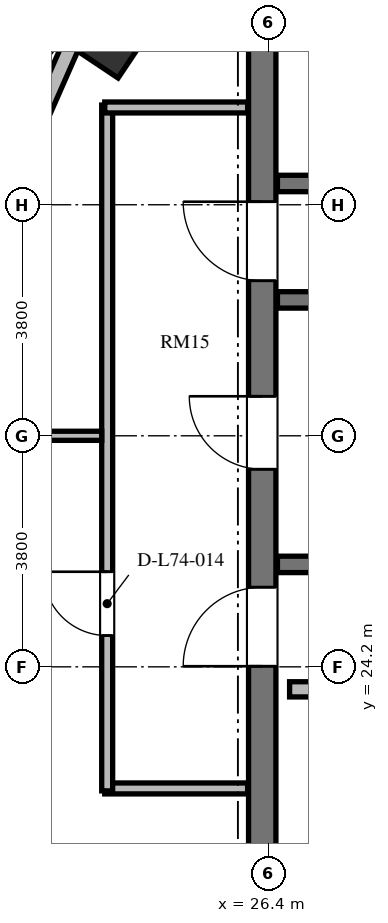
"""IFC4 building model, lengths in metres.
Left out: names, types, materials, properties, quantities, classifications, styles, units other than length and angle.
Written with IfcOpenShell. Run it as: python <this file> out.ifc"""

import sys

from ifc_helpers import new_model, si_unit, direction, frame, frame_2d, origin, origin_2d, place, context, subcontext, project, spatial, rectangle, extrude, element, fill, save


model = new_model("IFC4")
c1 = context("Model", 3, precision=1e-05, world=origin(), true_north=direction((0.0, 1.0)))
c2 = subcontext(c1, "Body", "Model", "MODEL_VIEW")
j1 = project(units=[si_unit("LENGTHUNIT", "METRE"), si_unit("PLANEANGLEUNIT", "RADIAN")], contexts=[c1])
p1 = place(None, origin())
s1 = spatial("IfcSite", under=j1, at=p1, CompositionType="ELEMENT")
p2 = place(p1, origin())
s2 = spatial("IfcBuilding", under=s1, at=p2, CompositionType="ELEMENT")
p3 = place(p2, frame((0.0, 0.0, 284.208)))
s3 = spatial("IfcBuildingStorey", under=s2, at=p3, CompositionType="ELEMENT", Elevation=284.208)
p4 = place(p3, frame((23.694, 34.522, 0.0), z_axis=(0.0, 0.0, 1.0), x_axis=(-0.831469612303, 0.55557023302, 0.0)))
e1 = element("IfcColumn", 1, at=p4, inside=s3, PredefinedType="COLUMN", context=c2, shape_type="SweptSolid", body=[
    extrude(rectangle(XDim=1.1, YDim=0.8, at=origin_2d()), origin(), (0.0, 0.0, 1.0), 3.648),
])
p5 = place(p3, frame((26.3, 20.95, 0.0), z_axis=(0.0, 0.0, 1.0), x_axis=(0.0, 1.0, 0.0)))
e2 = element("IfcWall", 2, at=p5, inside=s3, PredefinedType="SHEAR", context=c2, shape_type="SweptSolid", body=[
    extrude(rectangle(XDim=14.1, YDim=0.45, at=frame_2d((7.05, 0.0))), origin(), (0.0, 0.0, 1.0), 3.648),
])
p6 = place(p5, frame((6.5, 0.0, 0.0)))
e3 = element("IfcOpeningElement", 3, at=p6, cuts=e2, PredefinedType="OPENING", context=c2, shape_type="SweptSolid", body=[
    extrude(rectangle(XDim=1.2, YDim=2.15, at=frame_2d((0.6, 1.075))), frame((0.0, 0.235, 0.0), z_axis=(0.0, -1.0, 0.0), x_axis=(1.0, 0.0, 0.0)), (0.0, 0.0, 1.0), 0.47),
])
p7 = place(p5, frame((9.6, 0.0, 0.0)))
e4 = element("IfcOpeningElement", 4, at=p7, cuts=e2, PredefinedType="OPENING", context=c2, shape_type="SweptSolid", body=[
    extrude(rectangle(XDim=1.3, YDim=2.2, at=frame_2d((0.65, 1.1))), frame((0.0, 0.235, 0.0), z_axis=(0.0, -1.0, 0.0), x_axis=(1.0, 0.0, 0.0)), (0.0, 0.0, 1.0), 0.47),
])
p8 = place(p5, frame((3.26, 0.0, 0.0)))
e5 = element("IfcOpeningElement", 5, at=p8, cuts=e2, PredefinedType="OPENING", context=c2, shape_type="SweptSolid", body=[
    extrude(rectangle(XDim=1.3, YDim=2.2, at=frame_2d((0.65, 1.1))), frame((0.0, 0.235, 0.0), z_axis=(0.0, -1.0, 0.0), x_axis=(1.0, 0.0, 0.0)), (0.0, 0.0, 1.0), 0.47),
])
p9 = place(p3, frame((23.352, 34.869, 0.0), z_axis=(0.0, 0.0, 1.0), x_axis=(-0.402882523888, -0.915251698685, 0.0)))
e6 = element("IfcWall", 6, at=p9, inside=s3, PredefinedType="SOLIDWALL", context=c2, shape_type="SweptSolid", body=[
    extrude(rectangle(XDim=5.856, YDim=0.28, at=frame_2d((2.928, 0.0))), origin(), (0.0, 0.0, 1.0), 3.448),
])
p10 = place(p9, frame((2.328, 0.0, 0.85)))
e7 = element("IfcOpeningElement", 7, at=p10, cuts=e6, PredefinedType="OPENING", context=c2, shape_type="SweptSolid", body=[
    extrude(rectangle(XDim=1.2, YDim=1.8, at=frame_2d((0.6, 0.9))), frame((0.0, 0.15, 0.0), z_axis=(0.0, -1.0, 0.0), x_axis=(1.0, 0.0, 0.0)), (0.0, 0.0, 1.0), 0.3),
])
p11 = place(p3, frame((20.993, 24.09, 0.0), z_axis=(0.0, 0.0, 1.0), x_axis=(0.402867150469, -0.91525846572, 0.0)))
e8 = element("IfcWall", 8, at=p11, inside=s3, PredefinedType="SOLIDWALL", context=c2, shape_type="SweptSolid", body=[
    extrude(rectangle(XDim=5.856, YDim=0.28, at=frame_2d((2.928, 0.0))), origin(), (0.0, 0.0, 1.0), 3.448),
])
p12 = place(p11, frame((2.328, 0.0, 0.85)))
e9 = element("IfcOpeningElement", 9, at=p12, cuts=e8, PredefinedType="OPENING", context=c2, shape_type="SweptSolid", body=[
    extrude(rectangle(XDim=1.2, YDim=1.8, at=frame_2d((0.6, 0.9))), frame((0.0, 0.15, 0.0), z_axis=(0.0, -1.0, 0.0), x_axis=(1.0, 0.0, 0.0)), (0.0, 0.0, 1.0), 0.3),
])
for number, where, z_axis, x_axis in (
    (10, (26.55, 30.235, 0.0), (0.0, 0.0, 1.0), (1.0, 0.0, 0.0)),
    (11, (26.55, 25.885, 0.0), (0.0, 0.0, 1.0), (1.0, 0.0, 0.0)),
):
    element("IfcWall", number, at=place(p3, frame(where, z_axis=z_axis, x_axis=x_axis)), inside=s3, PredefinedType="SHEAR", context=c2, shape_type="SweptSolid", body=[
        extrude(rectangle(XDim=7.985, YDim=0.27, at=frame_2d((3.992, 0.0))), origin(), (0.0, 0.0, 1.0), 3.648),
    ])
p13 = place(p3, frame((26.55, 32.15, 0.0), z_axis=(0.0, 0.0, 1.0), x_axis=(1.0, 0.0, 0.0)))
e12 = element("IfcWall", 12, at=p13, inside=s3, PredefinedType="SHEAR", context=c2, shape_type="SweptSolid", body=[
    extrude(rectangle(XDim=16.4, YDim=0.27, at=frame_2d((8.2, 0.0))), origin(), (0.0, 0.0, 1.0), 3.648),
])
p14 = place(p13, frame((1.375, 0.0, 0.0)))
e13 = element("IfcOpeningElement", 13, at=p14, cuts=e12, PredefinedType="OPENING", context=c2, shape_type="SweptSolid", body=[
    extrude(rectangle(XDim=1.05, YDim=2.15, at=frame_2d((0.525, 1.075))), frame((0.0, 0.145, 0.0), z_axis=(0.0, -1.0, 0.0), x_axis=(1.0, 0.0, 0.0)), (0.0, 0.0, 1.0), 0.29),
])
p15 = place(p13, frame((4.975, 0.0, 0.0)))
e14 = element("IfcOpeningElement", 14, at=p15, cuts=e12, PredefinedType="OPENING", context=c2, shape_type="SweptSolid", body=[
    extrude(rectangle(XDim=1.05, YDim=2.15, at=frame_2d((0.525, 1.075))), frame((0.0, 0.145, 0.0), z_axis=(0.0, -1.0, 0.0), x_axis=(1.0, 0.0, 0.0)), (0.0, 0.0, 1.0), 0.29),
])
p16 = place(p13, frame((8.625, 0.0, 0.0)))
e15 = element("IfcOpeningElement", 15, at=p16, cuts=e12, PredefinedType="OPENING", context=c2, shape_type="SweptSolid", body=[
    extrude(rectangle(XDim=1.05, YDim=2.15, at=frame_2d((0.525, 1.075))), frame((0.0, 0.145, 0.0), z_axis=(0.0, -1.0, 0.0), x_axis=(1.0, 0.0, 0.0)), (0.0, 0.0, 1.0), 0.29),
])
p17 = place(p13, frame((11.9, 0.0, 0.0)))
e16 = element("IfcOpeningElement", 16, at=p17, cuts=e12, PredefinedType="OPENING", context=c2, shape_type="SweptSolid", body=[
    extrude(rectangle(XDim=1.1, YDim=2.2, at=frame_2d((0.55, 1.1))), frame((0.0, 0.145, 0.0), z_axis=(0.0, -1.0, 0.0), x_axis=(1.0, 0.0, 0.0)), (0.0, 0.0, 1.0), 0.29),
])
p18 = place(p13, frame((14.5, 0.0, 0.0)))
e17 = element("IfcOpeningElement", 17, at=p18, cuts=e12, PredefinedType="OPENING", context=c2, shape_type="SweptSolid", body=[
    extrude(rectangle(XDim=1.1, YDim=2.2, at=frame_2d((0.55, 1.1))), frame((0.0, 0.145, 0.0), z_axis=(0.0, -1.0, 0.0), x_axis=(1.0, 0.0, 0.0)), (0.0, 0.0, 1.0), 0.29),
])
p19 = place(p3, frame((26.75, 23.83, 0.0), z_axis=(0.0, 0.0, 1.0), x_axis=(1.0, 0.0, 0.0)))
e18 = element("IfcWall", 18, at=p19, inside=s3, PredefinedType="SOLIDWALL", context=c2, shape_type="SweptSolid", body=[
    extrude(rectangle(XDim=16.2, YDim=0.25, at=frame_2d((8.1, 0.0))), origin(), (0.0, 0.0, 1.0), 3.448),
])
p20 = place(p19, frame((2.025, 0.0, 0.0)))
e19 = element("IfcOpeningElement", 19, at=p20, cuts=e18, PredefinedType="OPENING", context=c2, shape_type="SweptSolid", body=[
    extrude(rectangle(XDim=1.05, YDim=2.15, at=frame_2d((0.525, 1.075))), frame((0.0, 0.135, 0.0), z_axis=(0.0, -1.0, 0.0), x_axis=(1.0, 0.0, 0.0)), (0.0, 0.0, 1.0), 0.27),
])
p21 = place(p19, frame((7.25, 0.0, 0.0)))
e20 = element("IfcOpeningElement", 20, at=p21, cuts=e18, PredefinedType="OPENING", context=c2, shape_type="SweptSolid", body=[
    extrude(rectangle(XDim=1.4, YDim=2.2, at=frame_2d((0.7, 1.1))), frame((0.0, 0.135, 0.0), z_axis=(0.0, -1.0, 0.0), x_axis=(1.0, 0.0, 0.0)), (0.0, 0.0, 1.0), 0.27),
])
p22 = place(p19, frame((11.7, 0.0, 0.0)))
e21 = element("IfcOpeningElement", 21, at=p22, cuts=e18, PredefinedType="OPENING", context=c2, shape_type="SweptSolid", body=[
    extrude(rectangle(XDim=1.1, YDim=2.2, at=frame_2d((0.55, 1.1))), frame((0.0, 0.135, 0.0), z_axis=(0.0, -1.0, 0.0), x_axis=(1.0, 0.0, 0.0)), (0.0, 0.0, 1.0), 0.27),
])
p23 = place(p19, frame((14.15, 0.0, 0.0)))
e22 = element("IfcOpeningElement", 22, at=p23, cuts=e18, PredefinedType="OPENING", context=c2, shape_type="SweptSolid", body=[
    extrude(rectangle(XDim=1.4, YDim=2.3, at=frame_2d((0.7, 1.15))), frame((0.0, 0.135, 0.0), z_axis=(0.0, -1.0, 0.0), x_axis=(1.0, 0.0, 0.0)), (0.0, 0.0, 1.0), 0.27),
])
p24 = place(p3, frame((26.06, 22.2, 0.0), z_axis=(0.0, 0.0, 1.0), x_axis=(-1.0, 0.0, 0.0)))
e23 = element("IfcWall", 23, at=p24, inside=s3, PredefinedType="PARTITIONING", context=c2, shape_type="SweptSolid", body=[
    extrude(rectangle(XDim=2.35, YDim=0.18, at=frame_2d((1.175, 0.0))), origin(), (0.0, 0.0, 1.0), 3.448),
])
p25 = place(p3, frame((23.75, 22.16, 0.0), z_axis=(0.0, 0.0, 1.0), x_axis=(0.0, 1.0, 0.0)))
e24 = element("IfcWall", 24, at=p25, inside=s3, PredefinedType="PARTITIONING", context=c2, shape_type="SweptSolid", body=[
    extrude(rectangle(XDim=11.28, YDim=0.18, at=frame_2d((5.64, 0.0))), origin(), (0.0, 0.0, 1.0), 3.448),
])
p26 = place(p25, frame((2.554, 0.0, 0.0)))
e25 = element("IfcOpeningElement", 25, at=p26, cuts=e24, PredefinedType="OPENING", context=c2, shape_type="SweptSolid", body=[
    extrude(rectangle(XDim=1.05, YDim=2.15, at=frame_2d((0.525, 1.075))), frame((0.0, 0.1, 0.0), z_axis=(0.0, -1.0, 0.0), x_axis=(1.0, 0.0, 0.0)), (0.0, 0.0, 1.0), 0.2),
])
p27 = place(p3, frame((23.71, 33.4, 0.0), z_axis=(0.0, 0.0, 1.0), x_axis=(1.0, 0.0, 0.0)))
e26 = element("IfcWall", 26, at=p27, inside=s3, PredefinedType="PARTITIONING", context=c2, shape_type="SweptSolid", body=[
    extrude(rectangle(XDim=2.35, YDim=0.18, at=frame_2d((1.175, 0.0))), origin(), (0.0, 0.0, 1.0), 3.448),
])
p28 = place(p3, frame((21.068, 28.0, 0.0), z_axis=(0.0, 0.0, 1.0), x_axis=(1.0, 0.0, 0.0)))
e27 = element("IfcWall", 27, at=p28, inside=s3, PredefinedType="PARTITIONING", context=c2, shape_type="SweptSolid", body=[
    extrude(rectangle(XDim=2.592, YDim=0.15, at=frame_2d((1.296, 0.0))), origin(), (0.0, 0.0, 1.0), 3.448),
])
p29 = place(p6, origin())
e28 = element("IfcDoor", 28, at=p29, inside=s3, OperationType="SINGLE_SWING_RIGHT", PredefinedType="DOOR", context=c2, shape_type="SweptSolid", body=[
    extrude(rectangle(XDim=1.2, YDim=2.15, at=frame_2d((0.6, 1.075))), frame((0.0, 0.025, 0.0), z_axis=(0.0, -1.0, 0.0), x_axis=(1.0, 0.0, 0.0)), (0.0, 0.0, 1.0), 0.05),
])
fill(e3, e28)
p30 = place(p7, origin())
e29 = element("IfcDoor", 29, at=p30, inside=s3, OperationType="SINGLE_SWING_RIGHT", PredefinedType="DOOR", context=c2, shape_type="SweptSolid", body=[
    extrude(rectangle(XDim=1.3, YDim=2.2, at=frame_2d((0.65, 1.1))), frame((0.0, 0.025, 0.0), z_axis=(0.0, -1.0, 0.0), x_axis=(1.0, 0.0, 0.0)), (0.0, 0.0, 1.0), 0.05),
])
fill(e4, e29)
p31 = place(p8, origin())
e30 = element("IfcDoor", 30, at=p31, inside=s3, OperationType="SINGLE_SWING_LEFT", PredefinedType="DOOR", context=c2, shape_type="SweptSolid", body=[
    extrude(rectangle(XDim=1.3, YDim=2.2, at=frame_2d((0.65, 1.1))), frame((0.0, 0.025, 0.0), z_axis=(0.0, -1.0, 0.0), x_axis=(1.0, 0.0, 0.0)), (0.0, 0.0, 1.0), 0.05),
])
fill(e5, e30)
p32 = place(p26, origin())
e31 = element("IfcDoor", 31, at=p32, inside=s3, OperationType="SINGLE_SWING_RIGHT", PredefinedType="DOOR", context=c2, shape_type="SweptSolid", body=[
    extrude(rectangle(XDim=1.05, YDim=2.15, at=frame_2d((0.525, 1.075))), frame((0.0, 0.025, 0.0), z_axis=(0.0, -1.0, 0.0), x_axis=(1.0, 0.0, 0.0)), (0.0, 0.0, 1.0), 0.05),
])
fill(e25, e31)
save(model, sys.argv[1])
